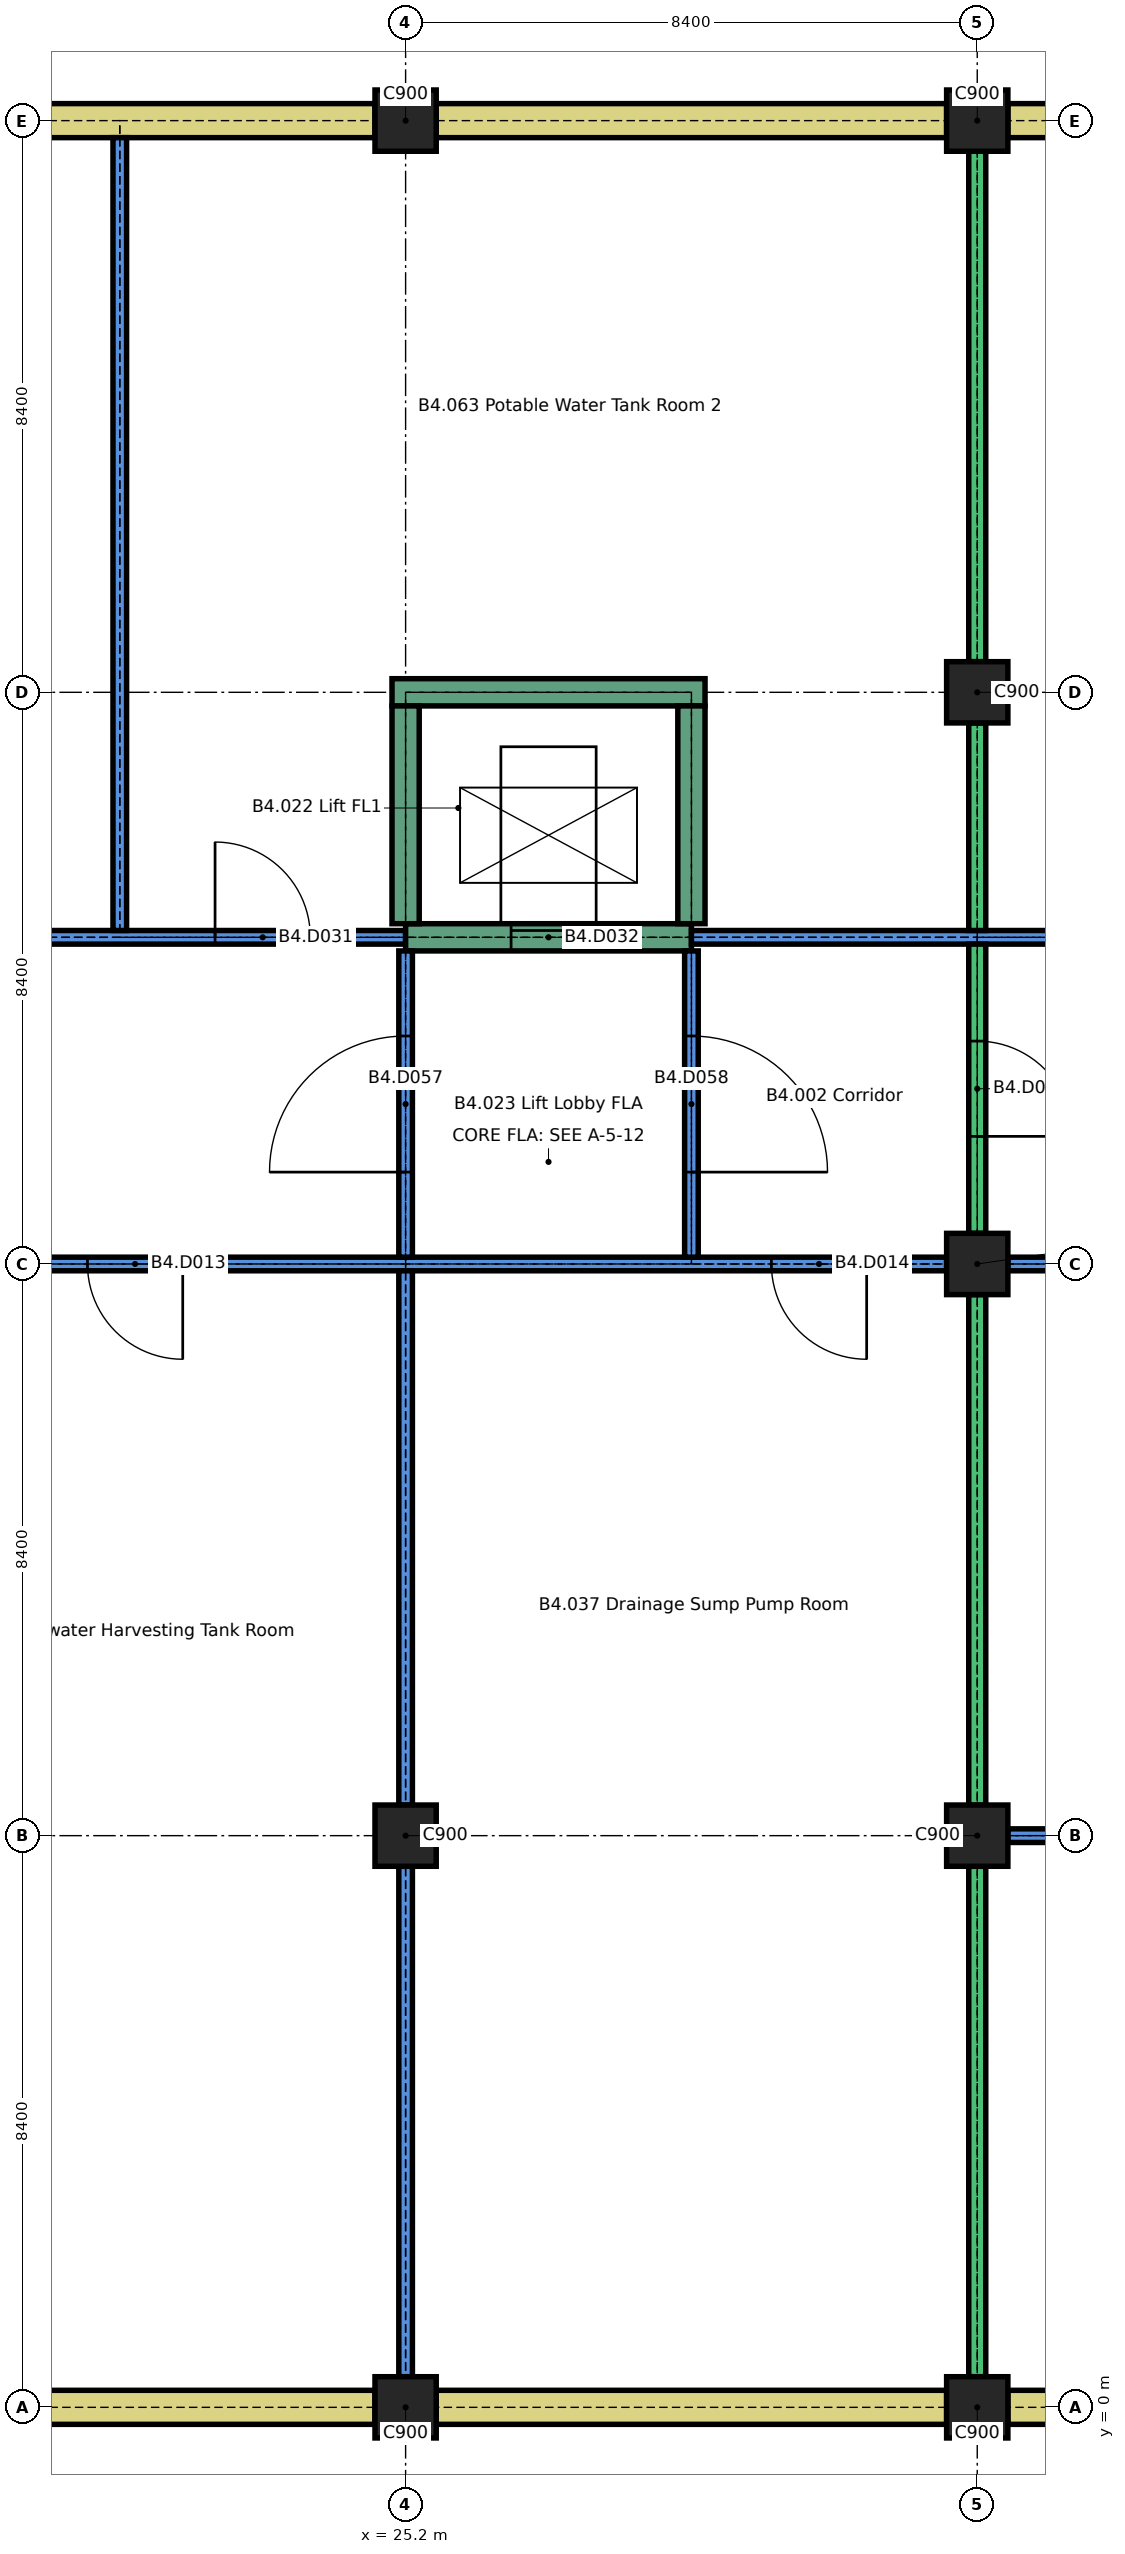
"""IFC4 building model, lengths in metres.
Left out: names, types, materials, properties, quantities, classifications, styles, units other than length and angle.
Written with IfcOpenShell. Run it as: python <this file> out.ifc"""

import sys

from ifc_helpers import new_model, si_unit, direction, frame, frame_2d, origin, origin_2d, place, context, subcontext, project, spatial, rectangle, extrude, element, fill, save


model = new_model("IFC4")
c1 = context("Model", 3, precision=1e-05, world=origin(), true_north=direction((0.0, 1.0)))
c2 = subcontext(c1, "Body", "Model", "MODEL_VIEW")
j1 = project(units=[si_unit("LENGTHUNIT", "METRE"), si_unit("PLANEANGLEUNIT", "RADIAN")], contexts=[c1])
p1 = place(None, origin())
s1 = spatial("IfcSite", under=j1, at=p1, CompositionType="ELEMENT")
p2 = place(p1, origin())
s2 = spatial("IfcBuilding", under=s1, at=p2, CompositionType="ELEMENT")
p3 = place(p2, frame((0.0, 0.0, -15.0)))
s3 = spatial("IfcBuildingStorey", under=s2, at=p3, CompositionType="ELEMENT", Elevation=-15.0)
for number, where, z_axis, x_axis in (
    (1, (25.2, 0.0, 0.0), (0.0, 0.0, 1.0), (1.0, 0.0, 0.0)),
    (2, (33.6, 0.0, 0.0), (0.0, 0.0, 1.0), (1.0, 0.0, 0.0)),
    (3, (25.2, 8.4, 0.0), (0.0, 0.0, 1.0), (1.0, 0.0, 0.0)),
    (4, (33.6, 8.4, 0.0), (0.0, 0.0, 1.0), (1.0, 0.0, 0.0)),
    (5, (33.6, 16.8, 0.0), (0.0, 0.0, 1.0), (1.0, 0.0, 0.0)),
    (6, (33.6, 25.2, 0.0), (0.0, 0.0, 1.0), (1.0, 0.0, 0.0)),
    (7, (25.2, 33.6, 0.0), (0.0, 0.0, 1.0), (1.0, 0.0, 0.0)),
    (8, (33.6, 33.6, 0.0), (0.0, 0.0, 1.0), (1.0, 0.0, 0.0)),
):
    element("IfcColumn", number, at=place(p3, frame(where, z_axis=z_axis, x_axis=x_axis)), inside=s3, PredefinedType="COLUMN", context=c2, shape_type="SweptSolid", body=[
        extrude(rectangle(XDim=0.9, YDim=0.9, at=origin_2d()), origin(), (0.0, 0.0, 1.0), 3.2),
    ])
for number, where, z_axis, x_axis in (
    (9, (17.25, 0.0, 0.0), (0.0, 0.0, 1.0), (1.0, 0.0, 0.0)),
    (10, (25.65, 0.0, 0.0), (0.0, 0.0, 1.0), (1.0, 0.0, 0.0)),
    (11, (34.05, 0.0, 0.0), (0.0, 0.0, 1.0), (1.0, 0.0, 0.0)),
    (12, (17.25, 33.6, 0.0), (0.0, 0.0, 1.0), (1.0, 0.0, 0.0)),
    (13, (25.65, 33.6, 0.0), (0.0, 0.0, 1.0), (1.0, 0.0, 0.0)),
    (14, (34.05, 33.6, 0.0), (0.0, 0.0, 1.0), (1.0, 0.0, 0.0)),
):
    element("IfcWall", number, at=place(p3, frame(where, z_axis=z_axis, x_axis=x_axis)), inside=s3, PredefinedType="SOLIDWALL", context=c2, shape_type="SweptSolid", body=[
        extrude(rectangle(XDim=7.5, YDim=0.5, at=frame_2d((3.75, 0.0))), origin(), (0.0, 0.0, 1.0), 3.2),
    ])
p4 = place(p3, frame((34.05, 8.4, 0.0), z_axis=(0.0, 0.0, 1.0), x_axis=(1.0, 0.0, 0.0)))
e15 = element("IfcWall", 15, at=p4, inside=s3, PredefinedType="PARTITIONING", context=c2, shape_type="SweptSolid", body=[
    extrude(rectangle(XDim=7.5, YDim=0.2, at=frame_2d((3.75, 0.0))), origin(), (0.0, 0.0, 1.0), 3.2),
])
p5 = place(p4, frame((3.05, 0.0, 0.0)))
e16 = element("IfcOpeningElement", 16, at=p5, cuts=e15, PredefinedType="OPENING", context=c2, shape_type="SweptSolid", body=[
    extrude(rectangle(XDim=1.4, YDim=2.1, at=frame_2d((0.7, 1.05))), frame((0.0, 0.11, 0.0), z_axis=(0.0, -1.0, 0.0), x_axis=(1.0, 0.0, 0.0)), (0.0, 0.0, 1.0), 0.22),
])
p6 = place(p3, frame((17.25, 16.8, 0.0), z_axis=(0.0, 0.0, 1.0), x_axis=(1.0, 0.0, 0.0)))
e17 = element("IfcWall", 17, at=p6, inside=s3, PredefinedType="PARTITIONING", context=c2, shape_type="SweptSolid", body=[
    extrude(rectangle(XDim=15.9, YDim=0.2, at=frame_2d((7.95, 0.0))), origin(), (0.0, 0.0, 1.0), 3.2),
])
p7 = place(p6, frame((3.275, 0.0, 0.0)))
e18 = element("IfcOpeningElement", 18, at=p7, cuts=e17, PredefinedType="OPENING", context=c2, shape_type="SweptSolid", body=[
    extrude(rectangle(XDim=1.4, YDim=2.1, at=frame_2d((0.7, 1.05))), frame((0.0, 0.11, 0.0), z_axis=(0.0, -1.0, 0.0), x_axis=(1.0, 0.0, 0.0)), (0.0, 0.0, 1.0), 0.22),
])
p8 = place(p6, frame((13.325, 0.0, 0.0)))
e19 = element("IfcOpeningElement", 19, at=p8, cuts=e17, PredefinedType="OPENING", context=c2, shape_type="SweptSolid", body=[
    extrude(rectangle(XDim=1.4, YDim=2.1, at=frame_2d((0.7, 1.05))), frame((0.0, 0.11, 0.0), z_axis=(0.0, -1.0, 0.0), x_axis=(1.0, 0.0, 0.0)), (0.0, 0.0, 1.0), 0.22),
])
p9 = place(p3, frame((34.05, 16.8, 0.0), z_axis=(0.0, 0.0, 1.0), x_axis=(1.0, 0.0, 0.0)))
e20 = element("IfcWall", 20, at=p9, inside=s3, PredefinedType="PARTITIONING", context=c2, shape_type="SweptSolid", body=[
    extrude(rectangle(XDim=7.5, YDim=0.2, at=frame_2d((3.75, 0.0))), origin(), (0.0, 0.0, 1.0), 3.2),
])
p10 = place(p9, frame((3.05, 0.0, 0.0)))
e21 = element("IfcOpeningElement", 21, at=p10, cuts=e20, PredefinedType="OPENING", context=c2, shape_type="SweptSolid", body=[
    extrude(rectangle(XDim=1.4, YDim=2.1, at=frame_2d((0.7, 1.05))), frame((0.0, 0.11, 0.0), z_axis=(0.0, -1.0, 0.0), x_axis=(1.0, 0.0, 0.0)), (0.0, 0.0, 1.0), 0.22),
])
p11 = place(p3, frame((8.3, 21.6, 0.0), z_axis=(0.0, 0.0, 1.0), x_axis=(1.0, 0.0, 0.0)))
e22 = element("IfcWall", 22, at=p11, inside=s3, PredefinedType="PARTITIONING", context=c2, shape_type="SweptSolid", body=[
    extrude(rectangle(XDim=16.9, YDim=0.2, at=frame_2d((8.45, 0.0))), origin(), (0.0, 0.0, 1.0), 3.2),
])
p12 = place(p11, frame((5.7, 0.0, 0.0)))
e23 = element("IfcOpeningElement", 23, at=p12, cuts=e22, PredefinedType="OPENING", context=c2, shape_type="SweptSolid", body=[
    extrude(rectangle(XDim=1.4, YDim=2.1, at=frame_2d((0.7, 1.05))), frame((0.0, 0.11, 0.0), z_axis=(0.0, -1.0, 0.0), x_axis=(1.0, 0.0, 0.0)), (0.0, 0.0, 1.0), 0.22),
])
p13 = place(p11, frame((14.1, 0.0, 0.0)))
e24 = element("IfcOpeningElement", 24, at=p13, cuts=e22, PredefinedType="OPENING", context=c2, shape_type="SweptSolid", body=[
    extrude(rectangle(XDim=1.4, YDim=2.1, at=frame_2d((0.7, 1.05))), frame((0.0, 0.11, 0.0), z_axis=(0.0, -1.0, 0.0), x_axis=(1.0, 0.0, 0.0)), (0.0, 0.0, 1.0), 0.22),
])
p14 = place(p3, frame((25.2, 21.6, 0.0), z_axis=(0.0, 0.0, 1.0), x_axis=(1.0, 0.0, 0.0)))
e25 = element("IfcWall", 25, at=p14, inside=s3, PredefinedType="SHEAR", context=c2, shape_type="SweptSolid", body=[
    extrude(rectangle(XDim=4.2, YDim=0.4, at=frame_2d((2.1, 0.0))), origin(), (0.0, 0.0, 1.0), 3.2),
])
p15 = place(p14, frame((1.55, 0.0, 0.0)))
e26 = element("IfcOpeningElement", 26, at=p15, cuts=e25, PredefinedType="OPENING", context=c2, shape_type="SweptSolid", body=[
    extrude(rectangle(XDim=1.1, YDim=2.1, at=frame_2d((0.55, 1.05))), frame((0.0, 0.21, 0.0), z_axis=(0.0, -1.0, 0.0), x_axis=(1.0, 0.0, 0.0)), (0.0, 0.0, 1.0), 0.42),
])
p16 = place(p3, frame((29.4, 21.6, 0.0), z_axis=(0.0, 0.0, 1.0), x_axis=(1.0, 0.0, 0.0)))
e27 = element("IfcWall", 27, at=p16, inside=s3, PredefinedType="PARTITIONING", context=c2, shape_type="SweptSolid", body=[
    extrude(rectangle(XDim=21.1, YDim=0.2, at=frame_2d((10.55, 0.0))), origin(), (0.0, 0.0, 1.0), 3.2),
])
p17 = place(p16, frame((11.9, 0.0, 0.0)))
e28 = element("IfcOpeningElement", 28, at=p17, cuts=e27, PredefinedType="OPENING", context=c2, shape_type="SweptSolid", body=[
    extrude(rectangle(XDim=1.4, YDim=2.1, at=frame_2d((0.7, 1.05))), frame((0.0, 0.11, 0.0), z_axis=(0.0, -1.0, 0.0), x_axis=(1.0, 0.0, 0.0)), (0.0, 0.0, 1.0), 0.22),
])
p18 = place(p3, frame((25.0, 25.2, 0.0), z_axis=(0.0, 0.0, 1.0), x_axis=(1.0, 0.0, 0.0)))
e29 = element("IfcWall", 29, at=p18, inside=s3, PredefinedType="SHEAR", context=c2, shape_type="SweptSolid", body=[
    extrude(rectangle(XDim=4.6, YDim=0.4, at=frame_2d((2.3, 0.0))), origin(), (0.0, 0.0, 1.0), 3.2),
])
p19 = place(p3, frame((21.0, 21.7, 0.0), z_axis=(0.0, 0.0, 1.0), x_axis=(0.0, 1.0, 0.0)))
e30 = element("IfcWall", 30, at=p19, inside=s3, PredefinedType="PARTITIONING", context=c2, shape_type="SweptSolid", body=[
    extrude(rectangle(XDim=11.65, YDim=0.2, at=frame_2d((5.825, 0.0))), origin(), (0.0, 0.0, 1.0), 3.2),
])
p20 = place(p3, frame((25.2, 0.45, 0.0), z_axis=(0.0, 0.0, 1.0), x_axis=(0.0, 1.0, 0.0)))
e31 = element("IfcWall", 31, at=p20, inside=s3, PredefinedType="PARTITIONING", context=c2, shape_type="SweptSolid", body=[
    extrude(rectangle(XDim=7.5, YDim=0.2, at=frame_2d((3.75, 0.0))), origin(), (0.0, 0.0, 1.0), 3.2),
])
p21 = place(p3, frame((25.2, 8.85, 0.0), z_axis=(0.0, 0.0, 1.0), x_axis=(0.0, 1.0, 0.0)))
e32 = element("IfcWall", 32, at=p21, inside=s3, PredefinedType="PARTITIONING", context=c2, shape_type="SweptSolid", body=[
    extrude(rectangle(XDim=7.85, YDim=0.2, at=frame_2d((3.925, 0.0))), origin(), (0.0, 0.0, 1.0), 3.2),
])
p22 = place(p3, frame((25.2, 16.9, 0.0), z_axis=(0.0, 0.0, 1.0), x_axis=(0.0, 1.0, 0.0)))
e33 = element("IfcWall", 33, at=p22, inside=s3, PredefinedType="PARTITIONING", context=c2, shape_type="SweptSolid", body=[
    extrude(rectangle(XDim=4.5, YDim=0.2, at=frame_2d((2.25, 0.0))), origin(), (0.0, 0.0, 1.0), 3.2),
])
p23 = place(p22, frame((1.25, 0.0, 0.0)))
e34 = element("IfcOpeningElement", 34, at=p23, cuts=e33, PredefinedType="OPENING", context=c2, shape_type="SweptSolid", body=[
    extrude(rectangle(XDim=2.0, YDim=2.4, at=frame_2d((1.0, 1.2))), frame((0.0, 0.11, 0.0), z_axis=(0.0, -1.0, 0.0), x_axis=(1.0, 0.0, 0.0)), (0.0, 0.0, 1.0), 0.22),
])
p24 = place(p3, frame((25.2, 21.8, 0.0), z_axis=(0.0, 0.0, 1.0), x_axis=(0.0, 1.0, 0.0)))
e35 = element("IfcWall", 35, at=p24, inside=s3, PredefinedType="SHEAR", context=c2, shape_type="SweptSolid", body=[
    extrude(rectangle(XDim=3.2, YDim=0.4, at=frame_2d((1.6, 0.0))), origin(), (0.0, 0.0, 1.0), 3.2),
])
p25 = place(p3, frame((29.4, 16.9, 0.0), z_axis=(0.0, 0.0, 1.0), x_axis=(0.0, 1.0, 0.0)))
e36 = element("IfcWall", 36, at=p25, inside=s3, PredefinedType="PARTITIONING", context=c2, shape_type="SweptSolid", body=[
    extrude(rectangle(XDim=4.5, YDim=0.2, at=frame_2d((2.25, 0.0))), origin(), (0.0, 0.0, 1.0), 3.2),
])
p26 = place(p25, frame((1.25, 0.0, 0.0)))
e37 = element("IfcOpeningElement", 37, at=p26, cuts=e36, PredefinedType="OPENING", context=c2, shape_type="SweptSolid", body=[
    extrude(rectangle(XDim=2.0, YDim=2.4, at=frame_2d((1.0, 1.2))), frame((0.0, 0.11, 0.0), z_axis=(0.0, -1.0, 0.0), x_axis=(1.0, 0.0, 0.0)), (0.0, 0.0, 1.0), 0.22),
])
p27 = place(p3, frame((29.4, 21.8, 0.0), z_axis=(0.0, 0.0, 1.0), x_axis=(0.0, 1.0, 0.0)))
e38 = element("IfcWall", 38, at=p27, inside=s3, PredefinedType="SHEAR", context=c2, shape_type="SweptSolid", body=[
    extrude(rectangle(XDim=3.2, YDim=0.4, at=frame_2d((1.6, 0.0))), origin(), (0.0, 0.0, 1.0), 3.2),
])
for number, where, z_axis, x_axis in (
    (39, (33.6, 0.45, 0.0), (0.0, 0.0, 1.0), (0.0, 1.0, 0.0)),
    (40, (33.6, 8.85, 0.0), (0.0, 0.0, 1.0), (0.0, 1.0, 0.0)),
):
    element("IfcWall", number, at=place(p3, frame(where, z_axis=z_axis, x_axis=x_axis)), inside=s3, PredefinedType="SOLIDWALL", context=c2, shape_type="SweptSolid", body=[
        extrude(rectangle(XDim=7.5, YDim=0.25, at=frame_2d((3.75, 0.0))), origin(), (0.0, 0.0, 1.0), 3.2),
    ])
p28 = place(p3, frame((33.6, 17.25, 0.0), z_axis=(0.0, 0.0, 1.0), x_axis=(0.0, 1.0, 0.0)))
e41 = element("IfcWall", 41, at=p28, inside=s3, PredefinedType="SOLIDWALL", context=c2, shape_type="SweptSolid", body=[
    extrude(rectangle(XDim=4.25, YDim=0.25, at=frame_2d((2.125, 0.0))), origin(), (0.0, 0.0, 1.0), 3.2),
])
p29 = place(p28, frame((1.425, 0.0, 0.0)))
e42 = element("IfcOpeningElement", 42, at=p29, cuts=e41, PredefinedType="OPENING", context=c2, shape_type="SweptSolid", body=[
    extrude(rectangle(XDim=1.4, YDim=2.1, at=frame_2d((0.7, 1.05))), frame((0.0, 0.135, 0.0), z_axis=(0.0, -1.0, 0.0), x_axis=(1.0, 0.0, 0.0)), (0.0, 0.0, 1.0), 0.27),
])
p30 = place(p3, frame((33.6, 21.7, 0.0), z_axis=(0.0, 0.0, 1.0), x_axis=(0.0, 1.0, 0.0)))
e43 = element("IfcWall", 43, at=p30, inside=s3, PredefinedType="SOLIDWALL", context=c2, shape_type="SweptSolid", body=[
    extrude(rectangle(XDim=3.05, YDim=0.25, at=frame_2d((1.525, 0.0))), origin(), (0.0, 0.0, 1.0), 3.2),
])
p31 = place(p3, frame((33.6, 25.65, 0.0), z_axis=(0.0, 0.0, 1.0), x_axis=(0.0, 1.0, 0.0)))
e44 = element("IfcWall", 44, at=p31, inside=s3, PredefinedType="SOLIDWALL", context=c2, shape_type="SweptSolid", body=[
    extrude(rectangle(XDim=7.5, YDim=0.25, at=frame_2d((3.75, 0.0))), origin(), (0.0, 0.0, 1.0), 3.2),
])
p32 = place(p7, origin())
e45 = element("IfcDoor", 45, at=p32, inside=s3, OperationType="SINGLE_SWING_RIGHT", PredefinedType="DOOR", context=c2, shape_type="SweptSolid", body=[
    extrude(rectangle(XDim=1.4, YDim=2.1, at=frame_2d((0.7, 1.05))), frame((0.0, 0.025, 0.0), z_axis=(0.0, -1.0, 0.0), x_axis=(1.0, 0.0, 0.0)), (0.0, 0.0, 1.0), 0.05),
])
fill(e18, e45)
p33 = place(p8, origin())
e46 = element("IfcDoor", 46, at=p33, inside=s3, OperationType="SINGLE_SWING_RIGHT", PredefinedType="DOOR", context=c2, shape_type="SweptSolid", body=[
    extrude(rectangle(XDim=1.4, YDim=2.1, at=frame_2d((0.7, 1.05))), frame((0.0, 0.025, 0.0), z_axis=(0.0, -1.0, 0.0), x_axis=(1.0, 0.0, 0.0)), (0.0, 0.0, 1.0), 0.05),
])
fill(e19, e46)
p34 = place(p13, origin())
e47 = element("IfcDoor", 47, at=p34, inside=s3, OperationType="SINGLE_SWING_RIGHT", PredefinedType="DOOR", context=c2, shape_type="SweptSolid", body=[
    extrude(rectangle(XDim=1.4, YDim=2.1, at=frame_2d((0.7, 1.05))), frame((0.0, 0.025, 0.0), z_axis=(0.0, -1.0, 0.0), x_axis=(1.0, 0.0, 0.0)), (0.0, 0.0, 1.0), 0.05),
])
fill(e24, e47)
p35 = place(p15, origin())
e48 = element("IfcDoor", 48, at=p35, inside=s3, OperationType="SLIDING_TO_LEFT", PredefinedType="DOOR", context=c2, shape_type="SweptSolid", body=[
    extrude(rectangle(XDim=1.1, YDim=2.1, at=frame_2d((0.55, 1.05))), frame((0.0, 0.025, 0.0), z_axis=(0.0, -1.0, 0.0), x_axis=(1.0, 0.0, 0.0)), (0.0, 0.0, 1.0), 0.05),
])
fill(e26, e48)
p36 = place(p23, origin())
e49 = element("IfcDoor", 49, at=p36, inside=s3, OperationType="SINGLE_SWING_RIGHT", PredefinedType="DOOR", context=c2, shape_type="SweptSolid", body=[
    extrude(rectangle(XDim=2.0, YDim=2.4, at=frame_2d((1.0, 1.2))), frame((0.0, 0.03, 0.0), z_axis=(0.0, -1.0, 0.0), x_axis=(1.0, 0.0, 0.0)), (0.0, 0.0, 1.0), 0.06),
])
fill(e34, e49)
p37 = place(p26, origin())
e50 = element("IfcDoor", 50, at=p37, inside=s3, OperationType="SINGLE_SWING_LEFT", PredefinedType="DOOR", context=c2, shape_type="SweptSolid", body=[
    extrude(rectangle(XDim=2.0, YDim=2.4, at=frame_2d((1.0, 1.2))), frame((0.0, 0.03, 0.0), z_axis=(0.0, -1.0, 0.0), x_axis=(1.0, 0.0, 0.0)), (0.0, 0.0, 1.0), 0.06),
])
fill(e37, e50)
p38 = place(p29, origin())
e51 = element("IfcDoor", 51, at=p38, inside=s3, OperationType="SINGLE_SWING_LEFT", PredefinedType="DOOR", context=c2, shape_type="SweptSolid", body=[
    extrude(rectangle(XDim=1.4, YDim=2.1, at=frame_2d((0.7, 1.05))), frame((0.0, 0.03, 0.0), z_axis=(0.0, -1.0, 0.0), x_axis=(1.0, 0.0, 0.0)), (0.0, 0.0, 1.0), 0.06),
])
fill(e42, e51)
save(model, sys.argv[1])
